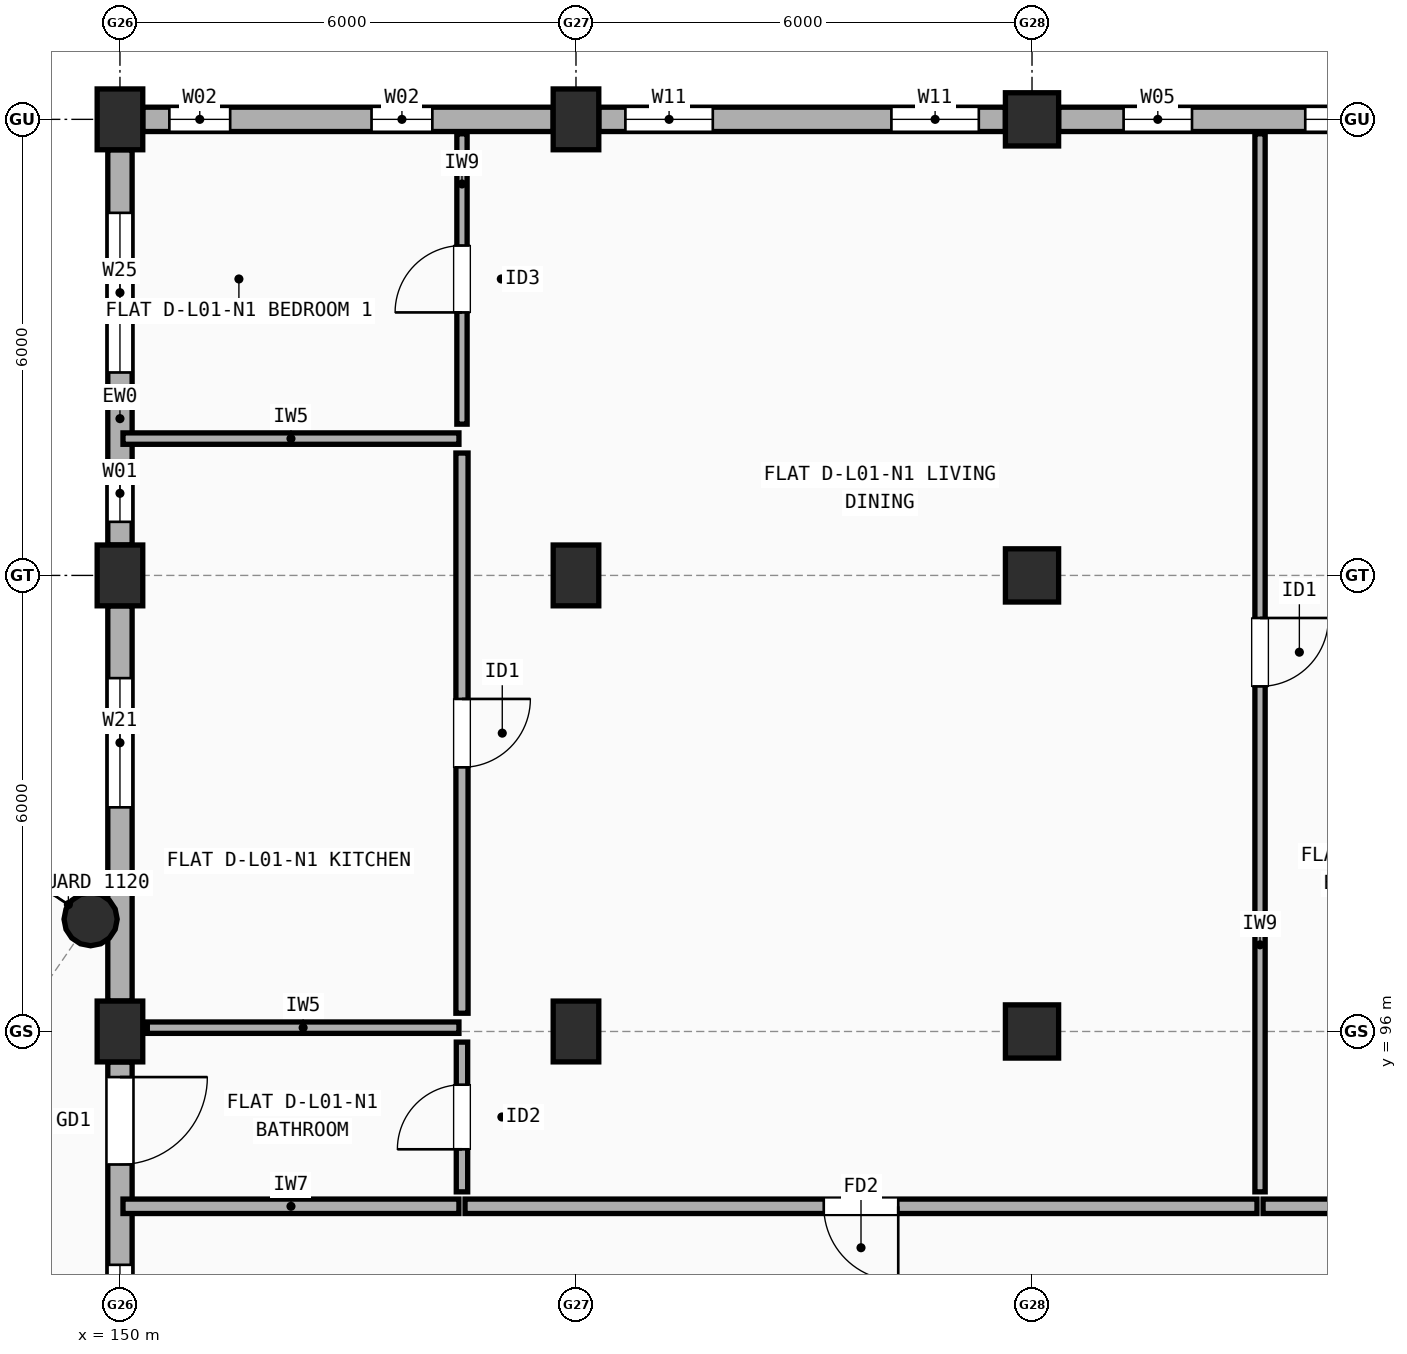
"""IFC4 building model, lengths in metres.
Left out: names, types, materials, properties, quantities, classifications, styles, units other than length and angle.
Written with IfcOpenShell. Run it as: python <this file> out.ifc"""

import sys

from ifc_helpers import new_model, si_unit, direction, frame, frame_2d, origin, origin_2d, place, context, subcontext, project, spatial, rectangle, circle, extrude, element, fill, save


model = new_model("IFC4")
c1 = context("Model", 3, precision=1e-05, world=origin(), true_north=direction((0.0, 1.0)))
c2 = subcontext(c1, "Body", "Model", "MODEL_VIEW")
j1 = project(units=[si_unit("LENGTHUNIT", "METRE"), si_unit("PLANEANGLEUNIT", "RADIAN")], contexts=[c1])
p1 = place(None, origin())
s1 = spatial("IfcSite", under=j1, at=p1, CompositionType="ELEMENT")
p2 = place(p1, origin())
s2 = spatial("IfcBuilding", under=s1, at=p2, CompositionType="ELEMENT")
p3 = place(p2, frame((0.0, 0.0, 4.5)))
s3 = spatial("IfcBuildingStorey", under=s2, at=p3, CompositionType="ELEMENT", Elevation=4.5)
for number, where, z_axis, x_axis in (
    (1, (150.0, 96.0, 0.0), (0.0, 0.0, 1.0), (1.0, 0.0, 0.0)),
    (2, (150.0, 102.0, 0.0), (0.0, 0.0, 1.0), (1.0, 0.0, 0.0)),
    (3, (150.0, 108.0, 0.0), (0.0, 0.0, 1.0), (1.0, 0.0, 0.0)),
    (4, (156.0, 96.0, 0.0), (0.0, 0.0, 1.0), (1.0, 0.0, 0.0)),
    (5, (156.0, 102.0, 0.0), (0.0, 0.0, 1.0), (1.0, 0.0, 0.0)),
    (6, (156.0, 108.0, 0.0), (0.0, 0.0, 1.0), (1.0, 0.0, 0.0)),
):
    element("IfcColumn", number, at=place(p3, frame(where, z_axis=z_axis, x_axis=x_axis)), inside=s3, PredefinedType="COLUMN", context=c2, shape_type="SweptSolid", body=[
        extrude(rectangle(XDim=0.6, YDim=0.8, at=origin_2d()), origin(), (0.0, 0.0, 1.0), 2.945),
    ])
for number, where, z_axis, x_axis in (
    (7, (162.0, 96.0, 0.0), (0.0, 0.0, 1.0), (1.0, 0.0, 0.0)),
    (8, (162.0, 102.0, 0.0), (0.0, 0.0, 1.0), (1.0, 0.0, 0.0)),
    (9, (162.0, 108.0, 0.0), (0.0, 0.0, 1.0), (1.0, 0.0, 0.0)),
):
    element("IfcColumn", number, at=place(p3, frame(where, z_axis=z_axis, x_axis=x_axis)), inside=s3, PredefinedType="COLUMN", context=c2, shape_type="SweptSolid", body=[
        extrude(rectangle(XDim=0.7, YDim=0.7, at=origin_2d()), origin(), (0.0, 0.0, 1.0), 2.945),
    ])
p4 = place(p3, frame((149.614, 97.477, 0.0), z_axis=(0.0, 0.0, 1.0), x_axis=(1.0, 0.0, 0.0)))
e10 = element("IfcColumn", 10, at=p4, inside=s3, PredefinedType="COLUMN", context=c2, shape_type="SweptSolid", body=[
    extrude(circle(Radius=0.35, at=origin_2d()), origin(), (0.0, 0.0, 1.0), 2.948),
])
p5 = place(p3, frame((167.65, 108.0, 0.0), z_axis=(0.0, 0.0, 1.0), x_axis=(-1.0, 0.0, 0.0)))
e11 = element("IfcWall", 11, at=p5, inside=s3, PredefinedType="STANDARD", context=c2, shape_type="SweptSolid", body=[
    extrude(rectangle(XDim=5.3, YDim=0.32, at=frame_2d((2.65, 0.0))), origin(), (0.0, 0.0, 1.0), 2.508),
])
p6 = place(p5, frame((0.555, 0.0, 0.9)))
e12 = element("IfcOpeningElement", 12, at=p6, cuts=e11, PredefinedType="OPENING", context=c2, shape_type="SweptSolid", body=[
    extrude(rectangle(XDim=1.5, YDim=1.4, at=frame_2d((0.75, 0.7))), frame((0.0, 0.17, 0.0), z_axis=(0.0, -1.0, 0.0), x_axis=(1.0, 0.0, 0.0)), (0.0, 0.0, 1.0), 0.34),
])
p7 = place(p5, frame((3.545, 0.0, 0.9)))
e13 = element("IfcOpeningElement", 13, at=p7, cuts=e11, PredefinedType="OPENING", context=c2, shape_type="SweptSolid", body=[
    extrude(rectangle(XDim=0.9, YDim=1.4, at=frame_2d((0.45, 0.7))), frame((0.0, 0.17, 0.0), z_axis=(0.0, -1.0, 0.0), x_axis=(1.0, 0.0, 0.0)), (0.0, 0.0, 1.0), 0.34),
])
p8 = place(p3, frame((161.65, 108.0, 0.0), z_axis=(0.0, 0.0, 1.0), x_axis=(-1.0, 0.0, 0.0)))
e14 = element("IfcWall", 14, at=p8, inside=s3, PredefinedType="STANDARD", context=c2, shape_type="SweptSolid", body=[
    extrude(rectangle(XDim=5.35, YDim=0.32, at=frame_2d((2.675, 0.0))), origin(), (0.0, 0.0, 1.0), 2.548),
])
p9 = place(p8, frame((0.35, 0.0, 0.9)))
e15 = element("IfcOpeningElement", 15, at=p9, cuts=e14, PredefinedType="OPENING", context=c2, shape_type="SweptSolid", body=[
    extrude(rectangle(XDim=1.15, YDim=1.45, at=frame_2d((0.575, 0.725))), frame((0.0, 0.17, 0.0), z_axis=(0.0, -1.0, 0.0), x_axis=(1.0, 0.0, 0.0)), (0.0, 0.0, 1.0), 0.34),
])
p10 = place(p8, frame((3.85, 0.0, 0.9)))
e16 = element("IfcOpeningElement", 16, at=p10, cuts=e14, PredefinedType="OPENING", context=c2, shape_type="SweptSolid", body=[
    extrude(rectangle(XDim=1.15, YDim=1.45, at=frame_2d((0.575, 0.725))), frame((0.0, 0.17, 0.0), z_axis=(0.0, -1.0, 0.0), x_axis=(1.0, 0.0, 0.0)), (0.0, 0.0, 1.0), 0.34),
])
p11 = place(p3, frame((155.7, 108.0, 0.0), z_axis=(0.0, 0.0, 1.0), x_axis=(-1.0, 0.0, 0.0)))
e17 = element("IfcWall", 17, at=p11, inside=s3, PredefinedType="STANDARD", context=c2, shape_type="SweptSolid", body=[
    extrude(rectangle(XDim=5.4, YDim=0.32, at=frame_2d((2.7, 0.0))), origin(), (0.0, 0.0, 1.0), 2.408),
])
p12 = place(p11, frame((1.59, 0.0, 0.9)))
e18 = element("IfcOpeningElement", 18, at=p12, cuts=e17, PredefinedType="OPENING", context=c2, shape_type="SweptSolid", body=[
    extrude(rectangle(XDim=0.8, YDim=1.2, at=frame_2d((0.4, 0.6))), frame((0.0, 0.17, 0.0), z_axis=(0.0, -1.0, 0.0), x_axis=(1.0, 0.0, 0.0)), (0.0, 0.0, 1.0), 0.34),
])
p13 = place(p11, frame((4.25, 0.0, 0.9)))
e19 = element("IfcOpeningElement", 19, at=p13, cuts=e17, PredefinedType="OPENING", context=c2, shape_type="SweptSolid", body=[
    extrude(rectangle(XDim=0.8, YDim=1.2, at=frame_2d((0.4, 0.6))), frame((0.0, 0.17, 0.0), z_axis=(0.0, -1.0, 0.0), x_axis=(1.0, 0.0, 0.0)), (0.0, 0.0, 1.0), 0.34),
])
p14 = place(p3, frame((150.0, 107.6, 0.0), z_axis=(0.0, 0.0, 1.0), x_axis=(0.0, -1.0, 0.0)))
e20 = element("IfcWall", 20, at=p14, inside=s3, PredefinedType="STANDARD", context=c2, shape_type="SweptSolid", body=[
    extrude(rectangle(XDim=5.2, YDim=0.32, at=frame_2d((2.6, 0.0))), origin(), (0.0, 0.0, 1.0), 2.945),
])
p15 = place(p14, frame((0.83, 0.0, 0.9)))
e21 = element("IfcOpeningElement", 21, at=p15, cuts=e20, PredefinedType="OPENING", context=c2, shape_type="SweptSolid", body=[
    extrude(rectangle(XDim=2.1, YDim=1.55, at=frame_2d((1.05, 0.775))), frame((0.0, 0.17, 0.0), z_axis=(0.0, -1.0, 0.0), x_axis=(1.0, 0.0, 0.0)), (0.0, 0.0, 1.0), 0.34),
])
p16 = place(p14, frame((4.145, 0.0, 0.9)))
e22 = element("IfcOpeningElement", 22, at=p16, cuts=e20, PredefinedType="OPENING", context=c2, shape_type="SweptSolid", body=[
    extrude(rectangle(XDim=0.75, YDim=1.15, at=frame_2d((0.375, 0.575))), frame((0.0, 0.17, 0.0), z_axis=(0.0, -1.0, 0.0), x_axis=(1.0, 0.0, 0.0)), (0.0, 0.0, 1.0), 0.34),
])
p17 = place(p3, frame((150.0, 101.6, 0.0), z_axis=(0.0, 0.0, 1.0), x_axis=(0.0, -1.0, 0.0)))
e23 = element("IfcWall", 23, at=p17, inside=s3, PredefinedType="STANDARD", context=c2, shape_type="SweptSolid", body=[
    extrude(rectangle(XDim=5.2, YDim=0.32, at=frame_2d((2.6, 0.0))), origin(), (0.0, 0.0, 1.0), 2.945),
])
p18 = place(p17, frame((0.951, 0.0, 0.9)))
e24 = element("IfcOpeningElement", 24, at=p18, cuts=e23, PredefinedType="OPENING", context=c2, shape_type="SweptSolid", body=[
    extrude(rectangle(XDim=1.7, YDim=1.55, at=frame_2d((0.85, 0.775))), frame((0.0, 0.17, 0.0), z_axis=(0.0, -1.0, 0.0), x_axis=(1.0, 0.0, 0.0)), (0.0, 0.0, 1.0), 0.34),
])
p19 = place(p3, frame((150.0, 95.6, 0.0), z_axis=(0.0, 0.0, 1.0), x_axis=(0.0, -1.0, 0.0)))
e25 = element("IfcWall", 25, at=p19, inside=s3, PredefinedType="STANDARD", context=c2, shape_type="SweptSolid", body=[
    extrude(rectangle(XDim=5.2, YDim=0.32, at=frame_2d((2.6, 0.0))), origin(), (0.0, 0.0, 1.0), 2.945),
])
p20 = place(p19, frame((0.2, 0.0, 0.0)))
e26 = element("IfcOpeningElement", 26, at=p20, cuts=e25, PredefinedType="OPENING", context=c2, shape_type="SweptSolid", body=[
    extrude(rectangle(XDim=1.15, YDim=2.15, at=frame_2d((0.575, 1.075))), frame((0.0, 0.17, 0.0), z_axis=(0.0, -1.0, 0.0), x_axis=(1.0, 0.0, 0.0)), (0.0, 0.0, 1.0), 0.34),
])
p21 = place(p19, frame((2.67, 0.0, 0.9)))
e27 = element("IfcOpeningElement", 27, at=p21, cuts=e25, PredefinedType="OPENING", context=c2, shape_type="SweptSolid", body=[
    extrude(rectangle(XDim=1.8, YDim=1.45, at=frame_2d((0.9, 0.725))), frame((0.0, 0.17, 0.0), z_axis=(0.0, -1.0, 0.0), x_axis=(1.0, 0.0, 0.0)), (0.0, 0.0, 1.0), 0.34),
])
p22 = place(p3, frame((150.04, 93.7, 0.0), z_axis=(0.0, 0.0, 1.0), x_axis=(1.0, 0.0, 0.0)))
e28 = element("IfcWall", 28, at=p22, inside=s3, PredefinedType="SOLIDWALL", context=c2, shape_type="SweptSolid", body=[
    extrude(rectangle(XDim=4.42, YDim=0.19, at=frame_2d((2.21, 0.0))), origin(), (0.0, 0.0, 1.0), 2.945),
])
p23 = place(p3, frame((154.54, 93.7, 0.0), z_axis=(0.0, 0.0, 1.0), x_axis=(1.0, 0.0, 0.0)))
e29 = element("IfcWall", 29, at=p23, inside=s3, PredefinedType="SOLIDWALL", context=c2, shape_type="SweptSolid", body=[
    extrude(rectangle(XDim=10.42, YDim=0.19, at=frame_2d((5.21, 0.0))), origin(), (0.0, 0.0, 1.0), 2.945),
])
p24 = place(p23, frame((4.72, 0.0, 0.0)))
e30 = element("IfcOpeningElement", 30, at=p24, cuts=e29, PredefinedType="OPENING", context=c2, shape_type="SweptSolid", body=[
    extrude(rectangle(XDim=0.98, YDim=2.15, at=frame_2d((0.49, 1.075))), frame((0.0, 0.105, 0.0), z_axis=(0.0, -1.0, 0.0), x_axis=(1.0, 0.0, 0.0)), (0.0, 0.0, 1.0), 0.21),
])
p25 = place(p3, frame((154.5, 103.99, 0.0), z_axis=(0.0, 0.0, 1.0), x_axis=(0.0, 1.0, 0.0)))
e31 = element("IfcWall", 31, at=p25, inside=s3, PredefinedType="PARTITIONING", context=c2, shape_type="SweptSolid", body=[
    extrude(rectangle(XDim=3.82, YDim=0.135, at=frame_2d((1.91, 0.0))), origin(), (0.0, 0.0, 1.0), 2.945),
])
p26 = place(p25, frame((1.47, 0.0, 0.0)))
e32 = element("IfcOpeningElement", 32, at=p26, cuts=e31, PredefinedType="OPENING", context=c2, shape_type="SweptSolid", body=[
    extrude(rectangle(XDim=0.88, YDim=2.1, at=frame_2d((0.44, 1.05))), frame((0.0, 0.077, 0.0), z_axis=(0.0, -1.0, 0.0), x_axis=(1.0, 0.0, 0.0)), (0.0, 0.0, 1.0), 0.155),
])
p27 = place(p3, frame((154.5, 96.24, 0.0), z_axis=(0.0, 0.0, 1.0), x_axis=(0.0, 1.0, 0.0)))
e33 = element("IfcWall", 33, at=p27, inside=s3, PredefinedType="PLUMBINGWALL", context=c2, shape_type="SweptSolid", body=[
    extrude(rectangle(XDim=7.37, YDim=0.16, at=frame_2d((3.685, 0.0))), origin(), (0.0, 0.0, 1.0), 2.548),
])
p28 = place(p27, frame((3.235, 0.0, 0.0)))
e34 = element("IfcOpeningElement", 34, at=p28, cuts=e33, PredefinedType="OPENING", context=c2, shape_type="SweptSolid", body=[
    extrude(rectangle(XDim=0.9, YDim=2.1, at=frame_2d((0.45, 1.05))), frame((0.0, 0.09, 0.0), z_axis=(0.0, -1.0, 0.0), x_axis=(1.0, 0.0, 0.0)), (0.0, 0.0, 1.0), 0.18),
])
p29 = place(p3, frame((154.5, 93.89, 0.0), z_axis=(0.0, 0.0, 1.0), x_axis=(0.0, 1.0, 0.0)))
e35 = element("IfcWall", 35, at=p29, inside=s3, PredefinedType="PARTITIONING", context=c2, shape_type="SweptSolid", body=[
    extrude(rectangle(XDim=1.97, YDim=0.15, at=frame_2d((0.985, 0.0))), origin(), (0.0, 0.0, 1.0), 2.945),
])
p30 = place(p29, frame((0.56, 0.0, 0.0)))
e36 = element("IfcOpeningElement", 36, at=p30, cuts=e35, PredefinedType="OPENING", context=c2, shape_type="SweptSolid", body=[
    extrude(rectangle(XDim=0.85, YDim=2.1, at=frame_2d((0.425, 1.05))), frame((0.0, 0.085, 0.0), z_axis=(0.0, -1.0, 0.0), x_axis=(1.0, 0.0, 0.0)), (0.0, 0.0, 1.0), 0.17),
])
p31 = place(p3, frame((150.04, 103.8, 0.0), z_axis=(0.0, 0.0, 1.0), x_axis=(1.0, 0.0, 0.0)))
e37 = element("IfcWall", 37, at=p31, inside=s3, PredefinedType="PARTITIONING", context=c2, shape_type="SweptSolid", body=[
    extrude(rectangle(XDim=4.42, YDim=0.15, at=frame_2d((2.21, 0.0))), origin(), (0.0, 0.0, 1.0), 2.945),
])
p32 = place(p3, frame((150.36, 96.05, 0.0), z_axis=(0.0, 0.0, 1.0), x_axis=(1.0, 0.0, 0.0)))
e38 = element("IfcWall", 38, at=p32, inside=s3, PredefinedType="PARTITIONING", context=c2, shape_type="SweptSolid", body=[
    extrude(rectangle(XDim=4.1, YDim=0.15, at=frame_2d((2.05, 0.0))), origin(), (0.0, 0.0, 1.0), 2.508),
])
p33 = place(p3, frame((165.04, 93.7, 0.0), z_axis=(0.0, 0.0, 1.0), x_axis=(1.0, 0.0, 0.0)))
e39 = element("IfcWall", 39, at=p33, inside=s3, PredefinedType="SOLIDWALL", context=c2, shape_type="SweptSolid", body=[
    extrude(rectangle(XDim=2.92, YDim=0.19, at=frame_2d((1.46, 0.0))), origin(), (0.0, 0.0, 1.0), 2.945),
])
p34 = place(p3, frame((165.0, 93.89, 0.0), z_axis=(0.0, 0.0, 1.0), x_axis=(0.0, 1.0, 0.0)))
e40 = element("IfcWall", 40, at=p34, inside=s3, PredefinedType="PARTITIONING", context=c2, shape_type="SweptSolid", body=[
    extrude(rectangle(XDim=13.92, YDim=0.135, at=frame_2d((6.96, 0.0))), origin(), (0.0, 0.0, 1.0), 2.458),
])
p35 = place(p34, frame((6.65, 0.0, 0.0)))
e41 = element("IfcOpeningElement", 41, at=p35, cuts=e40, PredefinedType="OPENING", context=c2, shape_type="SweptSolid", body=[
    extrude(rectangle(XDim=0.9, YDim=2.1, at=frame_2d((0.45, 1.05))), frame((0.0, 0.077, 0.0), z_axis=(0.0, -1.0, 0.0), x_axis=(1.0, 0.0, 0.0)), (0.0, 0.0, 1.0), 0.155),
])
p36 = place(p6, origin())
e42 = element("IfcWindow", 42, at=p36, inside=s3, PartitioningType="SINGLE_PANEL", PredefinedType="WINDOW", context=c2, shape_type="SweptSolid", body=[
    extrude(rectangle(XDim=1.5, YDim=1.4, at=frame_2d((0.75, 0.7))), frame((0.0, 0.03, 0.0), z_axis=(0.0, -1.0, 0.0), x_axis=(1.0, 0.0, 0.0)), (0.0, 0.0, 1.0), 0.06),
])
fill(e12, e42)
p37 = place(p7, origin())
e43 = element("IfcWindow", 43, at=p37, inside=s3, PartitioningType="SINGLE_PANEL", PredefinedType="WINDOW", context=c2, shape_type="SweptSolid", body=[
    extrude(rectangle(XDim=0.9, YDim=1.4, at=frame_2d((0.45, 0.7))), frame((0.0, 0.03, 0.0), z_axis=(0.0, -1.0, 0.0), x_axis=(1.0, 0.0, 0.0)), (0.0, 0.0, 1.0), 0.06),
])
fill(e13, e43)
p38 = place(p9, origin())
e44 = element("IfcWindow", 44, at=p38, inside=s3, PartitioningType="SINGLE_PANEL", PredefinedType="WINDOW", context=c2, shape_type="SweptSolid", body=[
    extrude(rectangle(XDim=1.15, YDim=1.45, at=frame_2d((0.575, 0.725))), frame((0.0, 0.03, 0.0), z_axis=(0.0, -1.0, 0.0), x_axis=(1.0, 0.0, 0.0)), (0.0, 0.0, 1.0), 0.06),
])
fill(e15, e44)
p39 = place(p10, origin())
e45 = element("IfcWindow", 45, at=p39, inside=s3, PartitioningType="SINGLE_PANEL", PredefinedType="WINDOW", context=c2, shape_type="SweptSolid", body=[
    extrude(rectangle(XDim=1.15, YDim=1.45, at=frame_2d((0.575, 0.725))), frame((0.0, 0.03, 0.0), z_axis=(0.0, -1.0, 0.0), x_axis=(1.0, 0.0, 0.0)), (0.0, 0.0, 1.0), 0.06),
])
fill(e16, e45)
p40 = place(p12, origin())
e46 = element("IfcWindow", 46, at=p40, inside=s3, PartitioningType="SINGLE_PANEL", PredefinedType="WINDOW", context=c2, shape_type="SweptSolid", body=[
    extrude(rectangle(XDim=0.8, YDim=1.2, at=frame_2d((0.4, 0.6))), frame((0.0, 0.03, 0.0), z_axis=(0.0, -1.0, 0.0), x_axis=(1.0, 0.0, 0.0)), (0.0, 0.0, 1.0), 0.06),
])
fill(e18, e46)
p41 = place(p13, origin())
e47 = element("IfcWindow", 47, at=p41, inside=s3, PartitioningType="SINGLE_PANEL", PredefinedType="WINDOW", context=c2, shape_type="SweptSolid", body=[
    extrude(rectangle(XDim=0.8, YDim=1.2, at=frame_2d((0.4, 0.6))), frame((0.0, 0.03, 0.0), z_axis=(0.0, -1.0, 0.0), x_axis=(1.0, 0.0, 0.0)), (0.0, 0.0, 1.0), 0.06),
])
fill(e19, e47)
p42 = place(p15, origin())
e48 = element("IfcWindow", 48, at=p42, inside=s3, PartitioningType="SINGLE_PANEL", PredefinedType="WINDOW", context=c2, shape_type="SweptSolid", body=[
    extrude(rectangle(XDim=2.1, YDim=1.55, at=frame_2d((1.05, 0.775))), frame((0.0, 0.03, 0.0), z_axis=(0.0, -1.0, 0.0), x_axis=(1.0, 0.0, 0.0)), (0.0, 0.0, 1.0), 0.06),
])
fill(e21, e48)
p43 = place(p16, origin())
e49 = element("IfcWindow", 49, at=p43, inside=s3, PartitioningType="SINGLE_PANEL", PredefinedType="WINDOW", context=c2, shape_type="SweptSolid", body=[
    extrude(rectangle(XDim=0.75, YDim=1.15, at=frame_2d((0.375, 0.575))), frame((0.0, 0.03, 0.0), z_axis=(0.0, -1.0, 0.0), x_axis=(1.0, 0.0, 0.0)), (0.0, 0.0, 1.0), 0.06),
])
fill(e22, e49)
p44 = place(p18, origin())
e50 = element("IfcWindow", 50, at=p44, inside=s3, PartitioningType="SINGLE_PANEL", PredefinedType="WINDOW", context=c2, shape_type="SweptSolid", body=[
    extrude(rectangle(XDim=1.7, YDim=1.55, at=frame_2d((0.85, 0.775))), frame((0.0, 0.03, 0.0), z_axis=(0.0, -1.0, 0.0), x_axis=(1.0, 0.0, 0.0)), (0.0, 0.0, 1.0), 0.06),
])
fill(e24, e50)
p45 = place(p20, frame((1.15, 0.0, 0.0), z_axis=(0.0, 0.0, 1.0), x_axis=(-1.0, 0.0, 0.0)))
e51 = element("IfcDoor", 51, at=p45, inside=s3, OperationType="SINGLE_SWING_LEFT", PredefinedType="DOOR", context=c2, shape_type="SweptSolid", body=[
    extrude(rectangle(XDim=1.15, YDim=2.15, at=frame_2d((0.575, 1.075))), frame((0.0, 0.025, 0.0), z_axis=(0.0, -1.0, 0.0), x_axis=(1.0, 0.0, 0.0)), (0.0, 0.0, 1.0), 0.05),
])
fill(e26, e51)
p46 = place(p21, origin())
e52 = element("IfcWindow", 52, at=p46, inside=s3, PartitioningType="SINGLE_PANEL", PredefinedType="WINDOW", context=c2, shape_type="SweptSolid", body=[
    extrude(rectangle(XDim=1.8, YDim=1.45, at=frame_2d((0.9, 0.725))), frame((0.0, 0.03, 0.0), z_axis=(0.0, -1.0, 0.0), x_axis=(1.0, 0.0, 0.0)), (0.0, 0.0, 1.0), 0.06),
])
fill(e27, e52)
p47 = place(p24, origin())
e53 = element("IfcDoor", 53, at=p47, inside=s3, OperationType="SINGLE_SWING_RIGHT", PredefinedType="DOOR", context=c2, shape_type="SweptSolid", body=[
    extrude(rectangle(XDim=0.98, YDim=2.15, at=frame_2d((0.49, 1.075))), frame((0.0, 0.025, 0.0), z_axis=(0.0, -1.0, 0.0), x_axis=(1.0, 0.0, 0.0)), (0.0, 0.0, 1.0), 0.05),
])
fill(e30, e53)
p48 = place(p26, origin())
e54 = element("IfcDoor", 54, at=p48, inside=s3, OperationType="SINGLE_SWING_LEFT", PredefinedType="DOOR", context=c2, shape_type="SweptSolid", body=[
    extrude(rectangle(XDim=0.88, YDim=2.1, at=frame_2d((0.44, 1.05))), frame((0.0, 0.025, 0.0), z_axis=(0.0, -1.0, 0.0), x_axis=(1.0, 0.0, 0.0)), (0.0, 0.0, 1.0), 0.05),
])
fill(e32, e54)
p49 = place(p28, origin())
e55 = element("IfcDoor", 55, at=p49, inside=s3, OperationType="SINGLE_SWING_RIGHT", PredefinedType="DOOR", context=c2, shape_type="SweptSolid", body=[
    extrude(rectangle(XDim=0.9, YDim=2.1, at=frame_2d((0.45, 1.05))), frame((0.0, 0.025, 0.0), z_axis=(0.0, -1.0, 0.0), x_axis=(1.0, 0.0, 0.0)), (0.0, 0.0, 1.0), 0.05),
])
fill(e34, e55)
p50 = place(p30, origin())
e56 = element("IfcDoor", 56, at=p50, inside=s3, OperationType="SINGLE_SWING_LEFT", PredefinedType="DOOR", context=c2, shape_type="SweptSolid", body=[
    extrude(rectangle(XDim=0.85, YDim=2.1, at=frame_2d((0.425, 1.05))), frame((0.0, 0.025, 0.0), z_axis=(0.0, -1.0, 0.0), x_axis=(1.0, 0.0, 0.0)), (0.0, 0.0, 1.0), 0.05),
])
fill(e36, e56)
p51 = place(p35, origin())
e57 = element("IfcDoor", 57, at=p51, inside=s3, OperationType="SINGLE_SWING_RIGHT", PredefinedType="DOOR", context=c2, shape_type="SweptSolid", body=[
    extrude(rectangle(XDim=0.9, YDim=2.1, at=frame_2d((0.45, 1.05))), frame((0.0, 0.025, 0.0), z_axis=(0.0, -1.0, 0.0), x_axis=(1.0, 0.0, 0.0)), (0.0, 0.0, 1.0), 0.05),
])
fill(e41, e57)
save(model, sys.argv[1])
